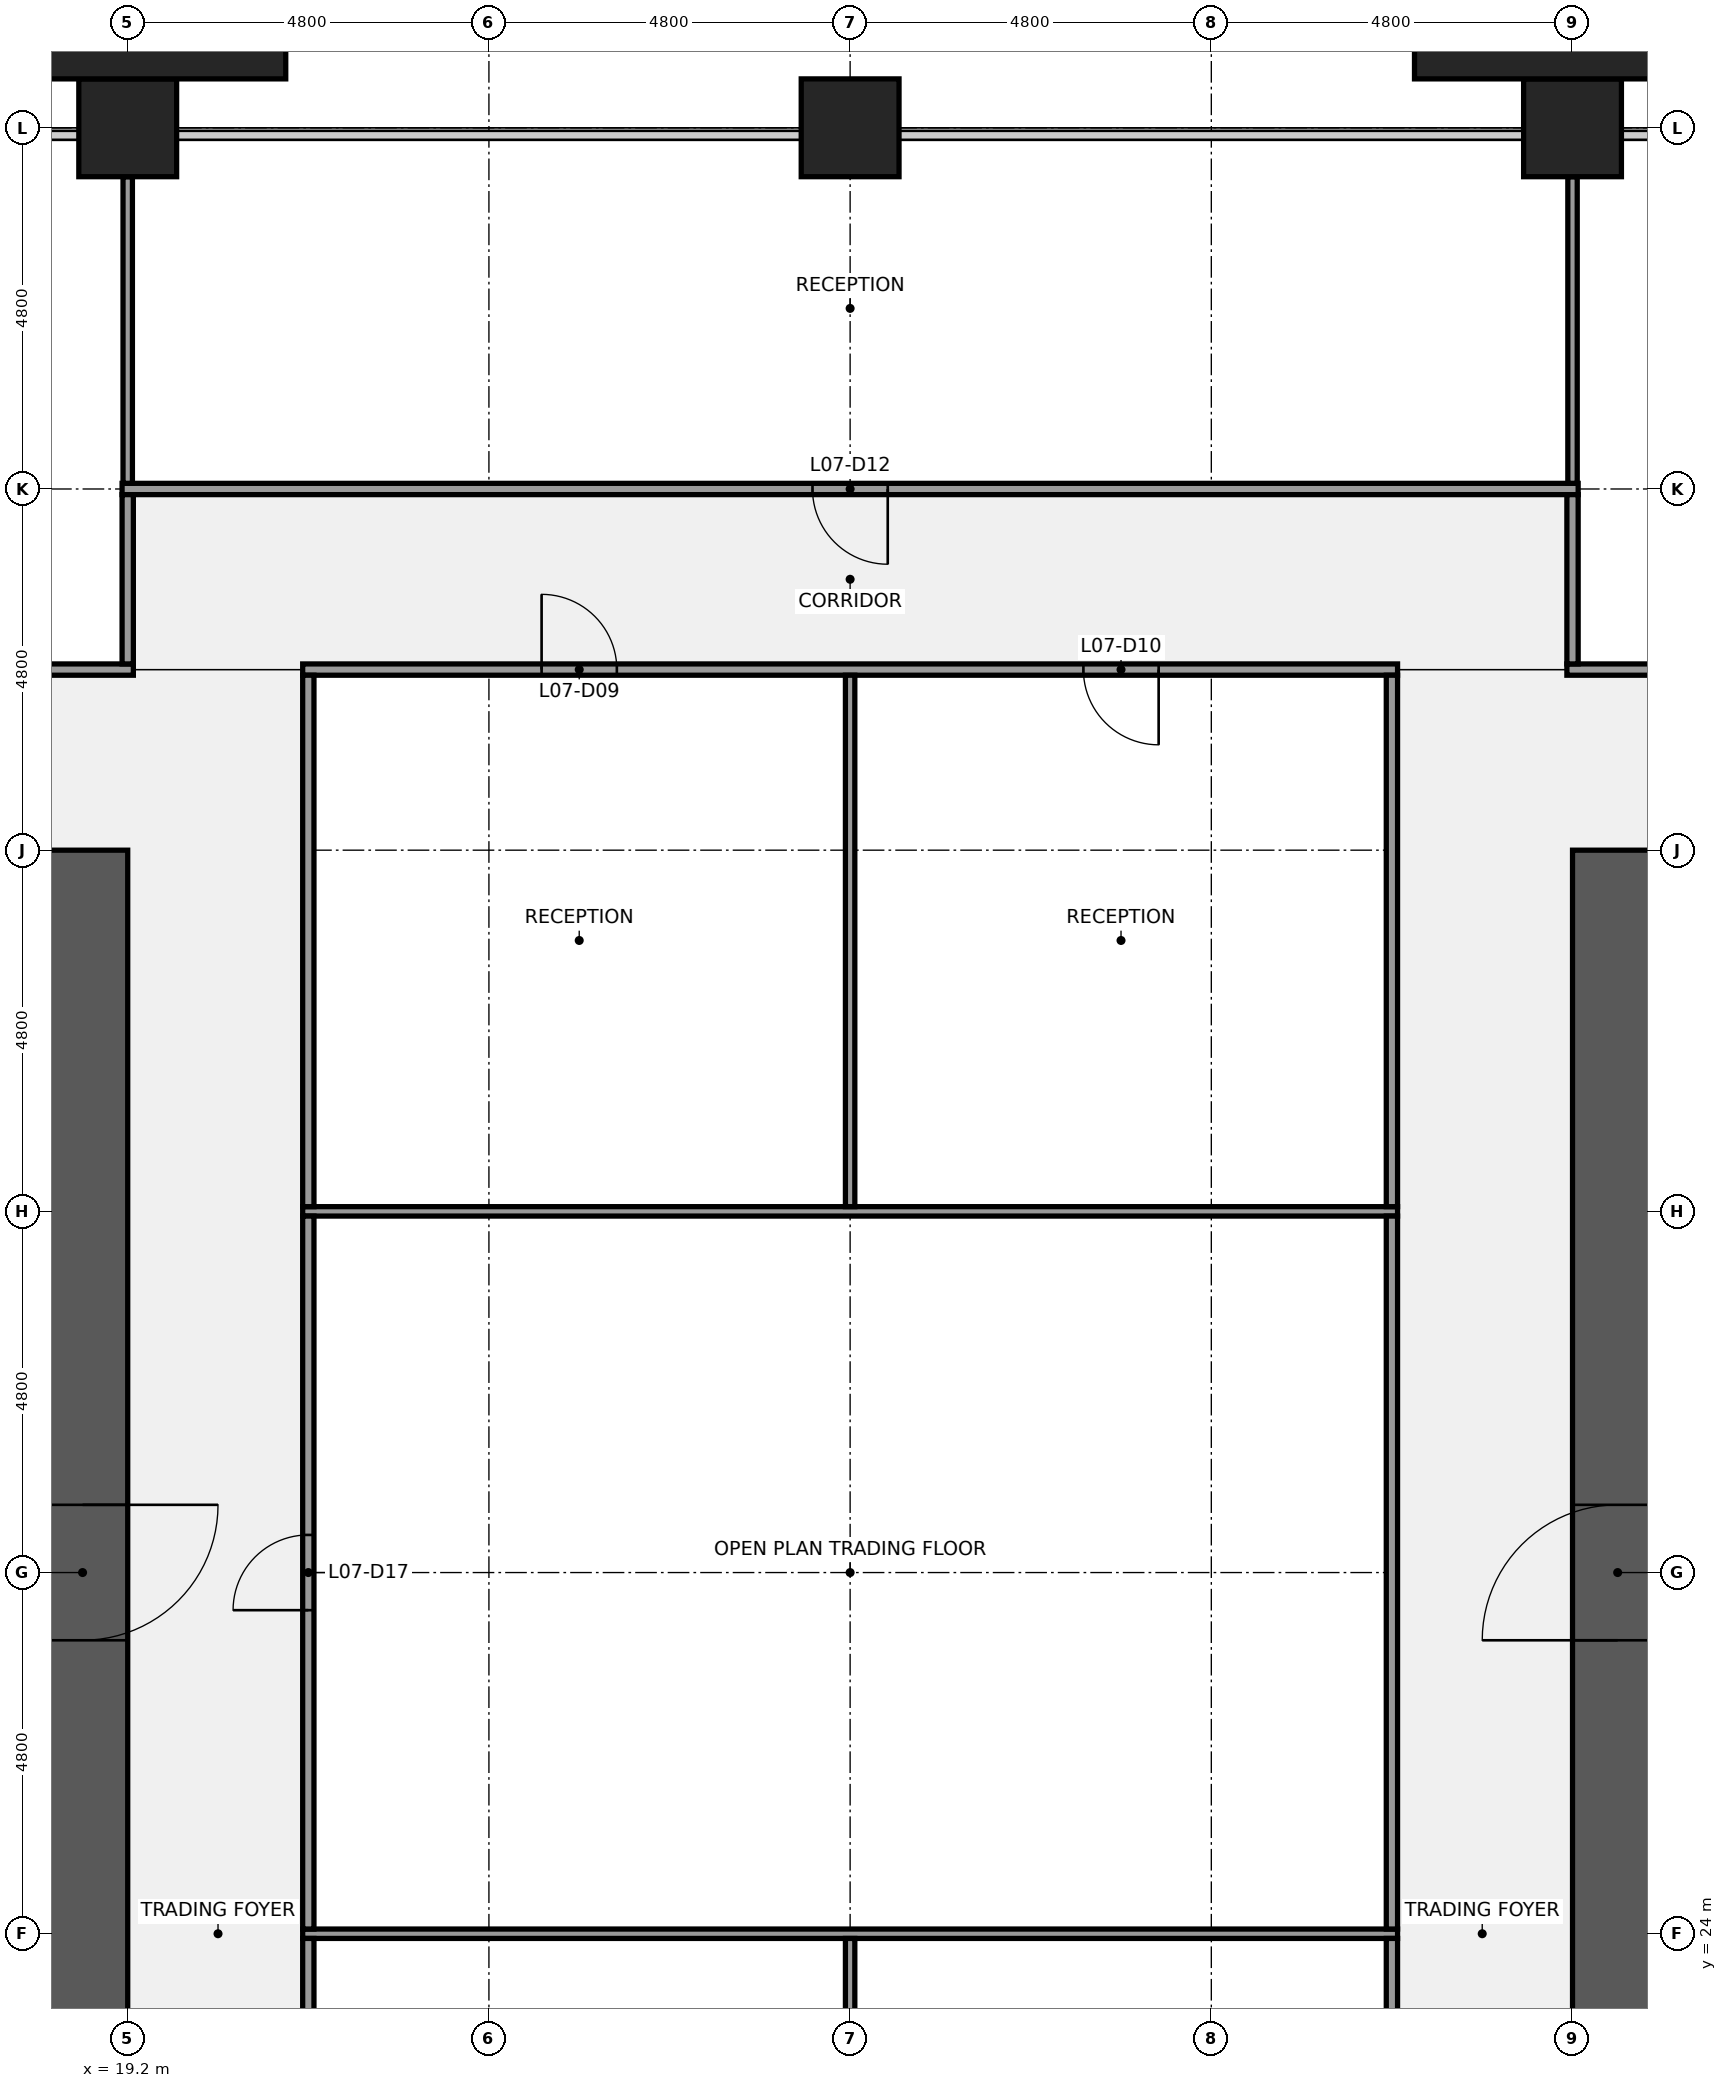
"""IFC4 building model, lengths in metres.
Left out: names, types, materials, properties, quantities, classifications, styles, units other than length and angle.
Written with IfcOpenShell. Run it as: python <this file> out.ifc"""

import sys

from ifc_helpers import new_model, si_unit, direction, frame, frame_2d, origin, origin_2d, place, context, subcontext, project, spatial, rectangle, extrude, element, fill, save


model = new_model("IFC4")
c1 = context("Model", 3, precision=1e-05, world=origin(), true_north=direction((0.0, 1.0)))
c2 = subcontext(c1, "Body", "Model", "MODEL_VIEW")
j1 = project(units=[si_unit("LENGTHUNIT", "METRE"), si_unit("PLANEANGLEUNIT", "RADIAN")], contexts=[c1])
p1 = place(None, origin())
s1 = spatial("IfcSite", under=j1, at=p1, CompositionType="ELEMENT")
p2 = place(p1, origin())
s2 = spatial("IfcBuilding", under=s1, at=p2, CompositionType="ELEMENT")
p3 = place(p2, frame((0.0, 0.0, 39.0)))
s3 = spatial("IfcBuildingStorey", under=s2, at=p3, CompositionType="ELEMENT", Elevation=39.0)
for number, where, z_axis, x_axis in (
    (1, (19.2, 48.0, 0.0), (0.0, 0.0, 1.0), (1.0, 0.0, 0.0)),
    (2, (28.8, 48.0, 0.0), (0.0, 0.0, 1.0), (1.0, 0.0, 0.0)),
    (3, (38.4, 48.0, 0.0), (0.0, 0.0, 1.0), (1.0, 0.0, 0.0)),
):
    element("IfcColumn", number, at=place(p3, frame(where, z_axis=z_axis, x_axis=x_axis)), inside=s3, PredefinedType="COLUMN", context=c2, shape_type="SweptSolid", body=[
        extrude(rectangle(XDim=1.3, YDim=1.3, at=origin_2d()), origin(), (0.0, 0.0, 1.0), 4.0),
    ])
p4 = place(p3, frame((18.6, 38.4, 0.0), z_axis=(0.0, 0.0, 1.0), x_axis=(0.0, -1.0, 0.0)))
e4 = element("IfcWall", 4, at=p4, inside=s3, PredefinedType="SHEAR", context=c2, shape_type="SweptSolid", body=[
    extrude(rectangle(XDim=28.8, YDim=1.2, at=frame_2d((14.4, 0.0))), origin(), (0.0, 0.0, 1.0), 3.84),
])
p5 = place(p4, frame((18.3, 0.0, 0.0)))
e5 = element("IfcOpeningElement", 5, at=p5, cuts=e4, PredefinedType="OPENING", context=c2, shape_type="SweptSolid", body=[
    extrude(rectangle(XDim=1.8, YDim=2.1, at=frame_2d((0.9, 1.05))), frame((0.0, 0.61, 0.0), z_axis=(0.0, -1.0, 0.0), x_axis=(1.0, 0.0, 0.0)), (0.0, 0.0, 1.0), 1.22),
])
p6 = place(p4, frame((8.7, 0.0, 0.0)))
e6 = element("IfcOpeningElement", 6, at=p6, cuts=e4, PredefinedType="OPENING", context=c2, shape_type="SweptSolid", body=[
    extrude(rectangle(XDim=1.8, YDim=2.1, at=frame_2d((0.9, 1.05))), frame((0.0, 0.61, 0.0), z_axis=(0.0, -1.0, 0.0), x_axis=(1.0, 0.0, 0.0)), (0.0, 0.0, 1.0), 1.22),
])
p7 = place(p3, frame((39.0, 9.6, 0.0), z_axis=(0.0, 0.0, 1.0), x_axis=(0.0, 1.0, 0.0)))
e7 = element("IfcWall", 7, at=p7, inside=s3, PredefinedType="SHEAR", context=c2, shape_type="SweptSolid", body=[
    extrude(rectangle(XDim=28.8, YDim=1.2, at=frame_2d((14.4, 0.0))), origin(), (0.0, 0.0, 1.0), 3.84),
])
p8 = place(p7, frame((8.7, 0.0, 0.0)))
e8 = element("IfcOpeningElement", 8, at=p8, cuts=e7, PredefinedType="OPENING", context=c2, shape_type="SweptSolid", body=[
    extrude(rectangle(XDim=1.8, YDim=2.1, at=frame_2d((0.9, 1.05))), frame((0.0, 0.61, 0.0), z_axis=(0.0, -1.0, 0.0), x_axis=(1.0, 0.0, 0.0)), (0.0, 0.0, 1.0), 1.22),
])
p9 = place(p7, frame((18.3, 0.0, 0.0)))
e9 = element("IfcOpeningElement", 9, at=p9, cuts=e7, PredefinedType="OPENING", context=c2, shape_type="SweptSolid", body=[
    extrude(rectangle(XDim=1.8, YDim=2.1, at=frame_2d((0.9, 1.05))), frame((0.0, 0.61, 0.0), z_axis=(0.0, -1.0, 0.0), x_axis=(1.0, 0.0, 0.0)), (0.0, 0.0, 1.0), 1.22),
])
for number, where, z_axis, x_axis in (
    (10, (21.525, 24.0, 0.0), (0.0, 0.0, 1.0), (1.0, 0.0, 0.0)),
    (11, (21.525, 33.6, 0.0), (0.0, 0.0, 1.0), (1.0, 0.0, 0.0)),
):
    element("IfcWall", number, at=place(p3, frame(where, z_axis=z_axis, x_axis=x_axis)), inside=s3, PredefinedType="PARTITIONING", context=c2, shape_type="SweptSolid", body=[
        extrude(rectangle(XDim=14.55, YDim=0.125, at=frame_2d((7.275, 0.0))), origin(), (0.0, 0.0, 1.0), 2.87),
    ])
p10 = place(p3, frame((14.325, 40.8, 0.0), z_axis=(0.0, 0.0, 1.0), x_axis=(1.0, 0.0, 0.0)))
e12 = element("IfcWall", 12, at=p10, inside=s3, PredefinedType="PARTITIONING", context=c2, shape_type="SweptSolid", body=[
    extrude(rectangle(XDim=4.95, YDim=0.15, at=frame_2d((2.475, 0.0))), origin(), (0.0, 0.0, 1.0), 2.87),
])
p11 = place(p10, frame((1.975, 0.0, 0.0)))
e13 = element("IfcOpeningElement", 13, at=p11, cuts=e12, PredefinedType="OPENING", context=c2, shape_type="SweptSolid", body=[
    extrude(rectangle(XDim=1.0, YDim=2.1, at=frame_2d((0.5, 1.05))), frame((0.0, 0.085, 0.0), z_axis=(0.0, -1.0, 0.0), x_axis=(1.0, 0.0, 0.0)), (0.0, 0.0, 1.0), 0.17),
])
p12 = place(p3, frame((21.525, 40.8, 0.0), z_axis=(0.0, 0.0, 1.0), x_axis=(1.0, 0.0, 0.0)))
e14 = element("IfcWall", 14, at=p12, inside=s3, PredefinedType="PARTITIONING", context=c2, shape_type="SweptSolid", body=[
    extrude(rectangle(XDim=14.55, YDim=0.15, at=frame_2d((7.275, 0.0))), origin(), (0.0, 0.0, 1.0), 2.87),
])
p13 = place(p12, frame((3.175, 0.0, 0.0)))
e15 = element("IfcOpeningElement", 15, at=p13, cuts=e14, PredefinedType="OPENING", context=c2, shape_type="SweptSolid", body=[
    extrude(rectangle(XDim=1.0, YDim=2.1, at=frame_2d((0.5, 1.05))), frame((0.0, 0.085, 0.0), z_axis=(0.0, -1.0, 0.0), x_axis=(1.0, 0.0, 0.0)), (0.0, 0.0, 1.0), 0.17),
])
p14 = place(p12, frame((10.375, 0.0, 0.0)))
e16 = element("IfcOpeningElement", 16, at=p14, cuts=e14, PredefinedType="OPENING", context=c2, shape_type="SweptSolid", body=[
    extrude(rectangle(XDim=1.0, YDim=2.1, at=frame_2d((0.5, 1.05))), frame((0.0, 0.085, 0.0), z_axis=(0.0, -1.0, 0.0), x_axis=(1.0, 0.0, 0.0)), (0.0, 0.0, 1.0), 0.17),
])
p15 = place(p3, frame((38.325, 40.8, 0.0), z_axis=(0.0, 0.0, 1.0), x_axis=(1.0, 0.0, 0.0)))
e17 = element("IfcWall", 17, at=p15, inside=s3, PredefinedType="PARTITIONING", context=c2, shape_type="SweptSolid", body=[
    extrude(rectangle(XDim=4.95, YDim=0.15, at=frame_2d((2.475, 0.0))), origin(), (0.0, 0.0, 1.0), 2.87),
])
p16 = place(p15, frame((1.975, 0.0, 0.0)))
e18 = element("IfcOpeningElement", 18, at=p16, cuts=e17, PredefinedType="OPENING", context=c2, shape_type="SweptSolid", body=[
    extrude(rectangle(XDim=1.0, YDim=2.1, at=frame_2d((0.5, 1.05))), frame((0.0, 0.085, 0.0), z_axis=(0.0, -1.0, 0.0), x_axis=(1.0, 0.0, 0.0)), (0.0, 0.0, 1.0), 0.17),
])
p17 = place(p3, frame((19.125, 43.2, 0.0), z_axis=(0.0, 0.0, 1.0), x_axis=(1.0, 0.0, 0.0)))
e19 = element("IfcWall", 19, at=p17, inside=s3, PredefinedType="PARTITIONING", context=c2, shape_type="SweptSolid", body=[
    extrude(rectangle(XDim=19.35, YDim=0.15, at=frame_2d((9.675, 0.0))), origin(), (0.0, 0.0, 1.0), 2.87),
])
p18 = place(p17, frame((9.175, 0.0, 0.0)))
e20 = element("IfcOpeningElement", 20, at=p18, cuts=e19, PredefinedType="OPENING", context=c2, shape_type="SweptSolid", body=[
    extrude(rectangle(XDim=1.0, YDim=2.1, at=frame_2d((0.5, 1.05))), frame((0.0, 0.085, 0.0), z_axis=(0.0, -1.0, 0.0), x_axis=(1.0, 0.0, 0.0)), (0.0, 0.0, 1.0), 0.17),
])
p19 = place(p3, frame((19.2, 43.275, 0.0), z_axis=(0.0, 0.0, 1.0), x_axis=(0.0, 1.0, 0.0)))
e21 = element("IfcWall", 21, at=p19, inside=s3, PredefinedType="PARTITIONING", context=c2, shape_type="SweptSolid", body=[
    extrude(rectangle(XDim=4.075, YDim=0.125, at=frame_2d((2.038, 0.0))), origin(), (0.0, 0.0, 1.0), 2.87),
])
p20 = place(p3, frame((19.2, 40.875, 0.0), z_axis=(0.0, 0.0, 1.0), x_axis=(0.0, 1.0, 0.0)))
e22 = element("IfcWall", 22, at=p20, inside=s3, PredefinedType="PARTITIONING", context=c2, shape_type="SweptSolid", body=[
    extrude(rectangle(XDim=2.25, YDim=0.15, at=frame_2d((1.125, 0.0))), origin(), (0.0, 0.0, 1.0), 2.87),
])
p21 = place(p3, frame((21.6, 14.462, 0.0), z_axis=(0.0, 0.0, 1.0), x_axis=(0.0, 1.0, 0.0)))
e23 = element("IfcWall", 23, at=p21, inside=s3, PredefinedType="PARTITIONING", context=c2, shape_type="SweptSolid", body=[
    extrude(rectangle(XDim=9.475, YDim=0.15, at=frame_2d((4.738, 0.0))), origin(), (0.0, 0.0, 1.0), 2.87),
])
p22 = place(p21, frame((4.238, 0.0, 0.0)))
e24 = element("IfcOpeningElement", 24, at=p22, cuts=e23, PredefinedType="OPENING", context=c2, shape_type="SweptSolid", body=[
    extrude(rectangle(XDim=1.0, YDim=2.1, at=frame_2d((0.5, 1.05))), frame((0.0, 0.085, 0.0), z_axis=(0.0, -1.0, 0.0), x_axis=(1.0, 0.0, 0.0)), (0.0, 0.0, 1.0), 0.17),
])
p23 = place(p3, frame((21.6, 24.062, 0.0), z_axis=(0.0, 0.0, 1.0), x_axis=(0.0, 1.0, 0.0)))
e25 = element("IfcWall", 25, at=p23, inside=s3, PredefinedType="PARTITIONING", context=c2, shape_type="SweptSolid", body=[
    extrude(rectangle(XDim=9.475, YDim=0.15, at=frame_2d((4.738, 0.0))), origin(), (0.0, 0.0, 1.0), 2.87),
])
p24 = place(p23, frame((4.238, 0.0, 0.0)))
e26 = element("IfcOpeningElement", 26, at=p24, cuts=e25, PredefinedType="OPENING", context=c2, shape_type="SweptSolid", body=[
    extrude(rectangle(XDim=1.0, YDim=2.1, at=frame_2d((0.5, 1.05))), frame((0.0, 0.085, 0.0), z_axis=(0.0, -1.0, 0.0), x_axis=(1.0, 0.0, 0.0)), (0.0, 0.0, 1.0), 0.17),
])
p25 = place(p3, frame((21.6, 33.663, 0.0), z_axis=(0.0, 0.0, 1.0), x_axis=(0.0, 1.0, 0.0)))
e27 = element("IfcWall", 27, at=p25, inside=s3, PredefinedType="PARTITIONING", context=c2, shape_type="SweptSolid", body=[
    extrude(rectangle(XDim=7.062, YDim=0.15, at=frame_2d((3.531, 0.0))), origin(), (0.0, 0.0, 1.0), 2.87),
])
p26 = place(p3, frame((28.8, 14.462, 0.0), z_axis=(0.0, 0.0, 1.0), x_axis=(0.0, 1.0, 0.0)))
e28 = element("IfcWall", 28, at=p26, inside=s3, PredefinedType="PARTITIONING", context=c2, shape_type="SweptSolid", body=[
    extrude(rectangle(XDim=9.475, YDim=0.125, at=frame_2d((4.738, 0.0))), origin(), (0.0, 0.0, 1.0), 2.87),
])
p27 = place(p3, frame((28.8, 33.663, 0.0), z_axis=(0.0, 0.0, 1.0), x_axis=(0.0, 1.0, 0.0)))
e29 = element("IfcWall", 29, at=p27, inside=s3, PredefinedType="PARTITIONING", context=c2, shape_type="SweptSolid", body=[
    extrude(rectangle(XDim=7.062, YDim=0.125, at=frame_2d((3.531, 0.0))), origin(), (0.0, 0.0, 1.0), 2.87),
])
p28 = place(p3, frame((36.0, 14.462, 0.0), z_axis=(0.0, 0.0, 1.0), x_axis=(0.0, 1.0, 0.0)))
e30 = element("IfcWall", 30, at=p28, inside=s3, PredefinedType="PARTITIONING", context=c2, shape_type="SweptSolid", body=[
    extrude(rectangle(XDim=9.475, YDim=0.15, at=frame_2d((4.738, 0.0))), origin(), (0.0, 0.0, 1.0), 2.87),
])
p29 = place(p28, frame((4.238, 0.0, 0.0)))
e31 = element("IfcOpeningElement", 31, at=p29, cuts=e30, PredefinedType="OPENING", context=c2, shape_type="SweptSolid", body=[
    extrude(rectangle(XDim=1.0, YDim=2.1, at=frame_2d((0.5, 1.05))), frame((0.0, 0.085, 0.0), z_axis=(0.0, -1.0, 0.0), x_axis=(1.0, 0.0, 0.0)), (0.0, 0.0, 1.0), 0.17),
])
p30 = place(p3, frame((36.0, 24.062, 0.0), z_axis=(0.0, 0.0, 1.0), x_axis=(0.0, 1.0, 0.0)))
e32 = element("IfcWall", 32, at=p30, inside=s3, PredefinedType="PARTITIONING", context=c2, shape_type="SweptSolid", body=[
    extrude(rectangle(XDim=9.475, YDim=0.15, at=frame_2d((4.738, 0.0))), origin(), (0.0, 0.0, 1.0), 2.87),
])
p31 = place(p3, frame((36.0, 33.663, 0.0), z_axis=(0.0, 0.0, 1.0), x_axis=(0.0, 1.0, 0.0)))
e33 = element("IfcWall", 33, at=p31, inside=s3, PredefinedType="PARTITIONING", context=c2, shape_type="SweptSolid", body=[
    extrude(rectangle(XDim=7.062, YDim=0.15, at=frame_2d((3.531, 0.0))), origin(), (0.0, 0.0, 1.0), 2.87),
])
p32 = place(p3, frame((38.4, 43.275, 0.0), z_axis=(0.0, 0.0, 1.0), x_axis=(0.0, 1.0, 0.0)))
e34 = element("IfcWall", 34, at=p32, inside=s3, PredefinedType="PARTITIONING", context=c2, shape_type="SweptSolid", body=[
    extrude(rectangle(XDim=4.075, YDim=0.125, at=frame_2d((2.038, 0.0))), origin(), (0.0, 0.0, 1.0), 2.87),
])
p33 = place(p3, frame((38.4, 40.875, 0.0), z_axis=(0.0, 0.0, 1.0), x_axis=(0.0, 1.0, 0.0)))
e35 = element("IfcWall", 35, at=p33, inside=s3, PredefinedType="PARTITIONING", context=c2, shape_type="SweptSolid", body=[
    extrude(rectangle(XDim=2.25, YDim=0.15, at=frame_2d((1.125, 0.0))), origin(), (0.0, 0.0, 1.0), 2.87),
])
for number, where, z_axis, x_axis in (
    (36, (19.2, 49.075, 0.0), (0.0, 0.0, 1.0), (1.0, 0.0, 0.0)),
    (37, (38.4, 49.075, 0.0), (0.0, 0.0, 1.0), (1.0, 0.0, 0.0)),
):
    element("IfcColumn", number, at=place(p3, frame(where, z_axis=z_axis, x_axis=x_axis)), inside=s3, PredefinedType="PILASTER", context=c2, shape_type="SweptSolid", body=[
        extrude(rectangle(XDim=4.2, YDim=0.85, at=origin_2d()), origin(), (0.0, 0.0, 1.0), 4.0),
    ])
p34 = place(p6, origin())
e38 = element("IfcDoor", 38, at=p34, inside=s3, OperationType="DOUBLE_DOOR_SINGLE_SWING", PredefinedType="DOOR", context=c2, shape_type="SweptSolid", body=[
    extrude(rectangle(XDim=1.8, YDim=2.1, at=frame_2d((0.9, 1.05))), frame((0.0, 0.025, 0.0), z_axis=(0.0, -1.0, 0.0), x_axis=(1.0, 0.0, 0.0)), (0.0, 0.0, 1.0), 0.05),
])
fill(e6, e38)
p35 = place(p9, origin())
e39 = element("IfcDoor", 39, at=p35, inside=s3, OperationType="DOUBLE_DOOR_SINGLE_SWING", PredefinedType="DOOR", context=c2, shape_type="SweptSolid", body=[
    extrude(rectangle(XDim=1.8, YDim=2.1, at=frame_2d((0.9, 1.05))), frame((0.0, 0.025, 0.0), z_axis=(0.0, -1.0, 0.0), x_axis=(1.0, 0.0, 0.0)), (0.0, 0.0, 1.0), 0.05),
])
fill(e9, e39)
p36 = place(p13, origin())
e40 = element("IfcDoor", 40, at=p36, inside=s3, OperationType="SINGLE_SWING_LEFT", PredefinedType="DOOR", context=c2, shape_type="SweptSolid", body=[
    extrude(rectangle(XDim=1.0, YDim=2.1, at=frame_2d((0.5, 1.05))), frame((0.0, 0.025, 0.0), z_axis=(0.0, -1.0, 0.0), x_axis=(1.0, 0.0, 0.0)), (0.0, 0.0, 1.0), 0.05),
])
fill(e15, e40)
p37 = place(p14, origin())
e41 = element("IfcDoor", 41, at=p37, inside=s3, OperationType="SINGLE_SWING_RIGHT", PredefinedType="DOOR", context=c2, shape_type="SweptSolid", body=[
    extrude(rectangle(XDim=1.0, YDim=2.1, at=frame_2d((0.5, 1.05))), frame((0.0, 0.025, 0.0), z_axis=(0.0, -1.0, 0.0), x_axis=(1.0, 0.0, 0.0)), (0.0, 0.0, 1.0), 0.05),
])
fill(e16, e41)
p38 = place(p18, origin())
e42 = element("IfcDoor", 42, at=p38, inside=s3, OperationType="SINGLE_SWING_RIGHT", PredefinedType="DOOR", context=c2, shape_type="SweptSolid", body=[
    extrude(rectangle(XDim=1.0, YDim=2.1, at=frame_2d((0.5, 1.05))), frame((0.0, 0.025, 0.0), z_axis=(0.0, -1.0, 0.0), x_axis=(1.0, 0.0, 0.0)), (0.0, 0.0, 1.0), 0.05),
])
fill(e20, e42)
p39 = place(p24, origin())
e43 = element("IfcDoor", 43, at=p39, inside=s3, OperationType="SINGLE_SWING_LEFT", PredefinedType="DOOR", context=c2, shape_type="SweptSolid", body=[
    extrude(rectangle(XDim=1.0, YDim=2.1, at=frame_2d((0.5, 1.05))), frame((0.0, 0.025, 0.0), z_axis=(0.0, -1.0, 0.0), x_axis=(1.0, 0.0, 0.0)), (0.0, 0.0, 1.0), 0.05),
])
fill(e26, e43)
save(model, sys.argv[1])
